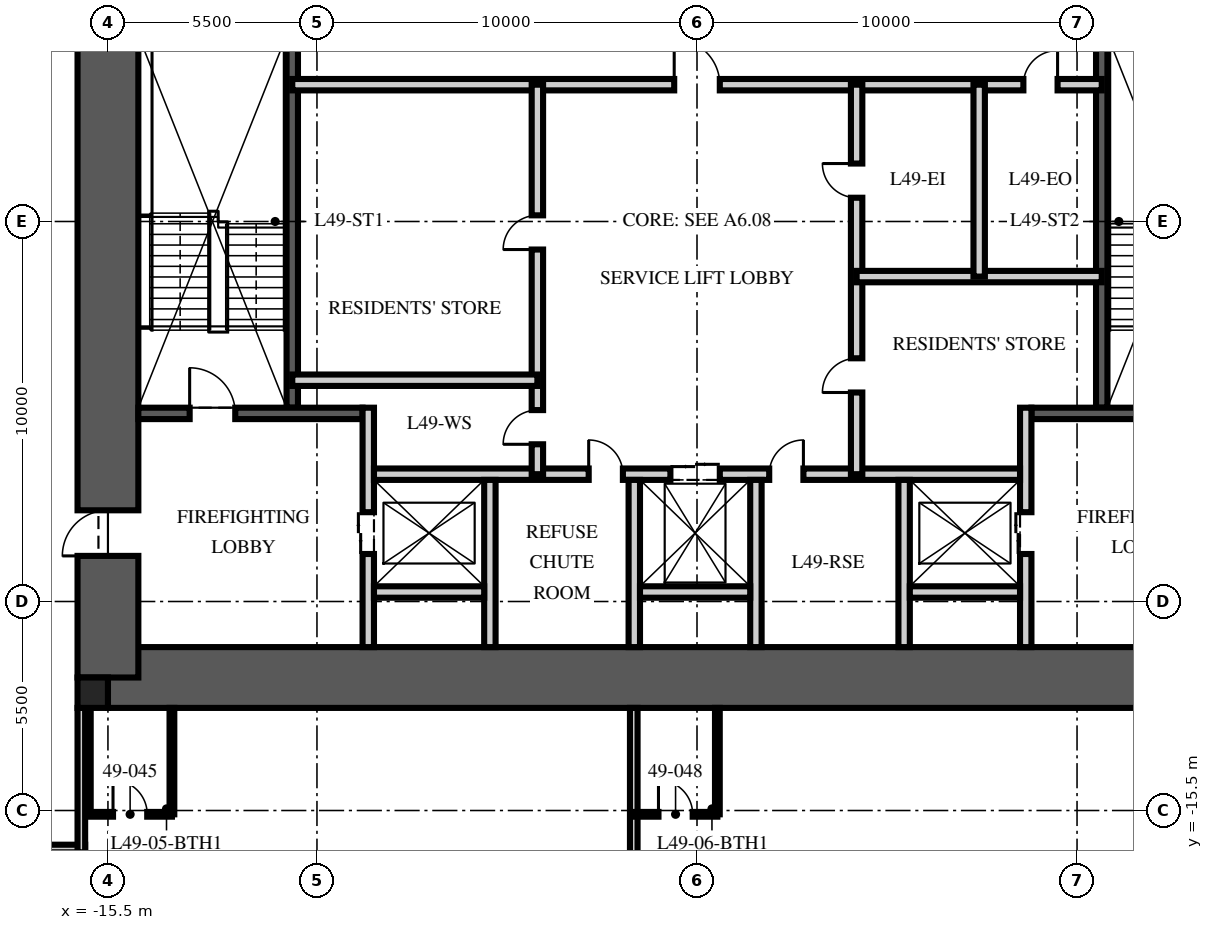
"""IFC4 building model, lengths in metres.
Left out: names, types, materials, properties, quantities, classifications, styles, units other than length and angle.
Written with IfcOpenShell. Run it as: python <this file> out.ifc"""

import sys

from ifc_helpers import new_model, si_unit, direction, frame, frame_2d, origin, origin_2d, place, context, subcontext, project, spatial, rectangle, extrude, element, fill, save


model = new_model("IFC4")
c1 = context("Model", 3, precision=1e-05, world=origin(), true_north=direction((0.0, 1.0)))
c2 = subcontext(c1, "Body", "Model", "MODEL_VIEW")
j1 = project(units=[si_unit("LENGTHUNIT", "METRE"), si_unit("PLANEANGLEUNIT", "RADIAN")], contexts=[c1])
p1 = place(None, origin())
s1 = spatial("IfcSite", under=j1, at=p1, CompositionType="ELEMENT")
p2 = place(p1, origin())
s2 = spatial("IfcBuilding", under=s1, at=p2, CompositionType="ELEMENT")
p3 = place(p2, frame((0.0, 0.0, 199.5)))
s3 = spatial("IfcBuildingStorey", under=s2, at=p3, CompositionType="ELEMENT", Elevation=199.5)
p4 = place(p3, frame((-15.5, -12.0, -0.25), z_axis=(0.0, 0.0, 1.0), x_axis=(1.0, 0.0, 0.0)))
e1 = element("IfcWall", 1, at=p4, inside=s3, PredefinedType="SHEAR", context=c2, shape_type="SweptSolid", body=[
    extrude(rectangle(XDim=31.0, YDim=1.6, at=frame_2d((15.5, 0.0))), origin(), (0.0, 0.0, 1.0), 3.75),
])
p5 = place(p3, frame((-15.5, -12.0, -0.25), z_axis=(0.0, 0.0, 1.0), x_axis=(0.0, 1.0, 0.0)))
e2 = element("IfcWall", 2, at=p5, inside=s3, PredefinedType="SHEAR", context=c2, shape_type="SweptSolid", body=[
    extrude(rectangle(XDim=24.0, YDim=1.6, at=frame_2d((12.0, 0.0))), origin(), (0.0, 0.0, 1.0), 3.75),
])
p6 = place(p5, frame((3.2, 0.0, 0.25)))
e3 = element("IfcOpeningElement", 3, at=p6, cuts=e2, PredefinedType="OPENING", context=c2, shape_type="SweptSolid", body=[
    extrude(rectangle(XDim=1.2, YDim=2.1, at=frame_2d((0.6, 1.05))), frame((0.0, 0.81, 0.0), z_axis=(0.0, -1.0, 0.0), x_axis=(1.0, 0.0, 0.0)), (0.0, 0.0, 1.0), 1.62),
])
p7 = place(p5, frame((19.3, 0.0, 0.25)))
e4 = element("IfcOpeningElement", 4, at=p7, cuts=e2, PredefinedType="OPENING", context=c2, shape_type="SweptSolid", body=[
    extrude(rectangle(XDim=1.8, YDim=2.1, at=frame_2d((0.9, 1.05))), frame((0.0, 0.81, 0.0), z_axis=(0.0, -1.0, 0.0), x_axis=(1.0, 0.0, 0.0)), (0.0, 0.0, 1.0), 1.62),
])
p8 = place(p3, frame((-15.9, -12.4, -0.25), z_axis=(0.0, 0.0, 1.0), x_axis=(1.0, 0.0, 0.0)))
e5 = element("IfcColumn", 5, at=p8, inside=s3, PredefinedType="COLUMN", context=c2, shape_type="SweptSolid", body=[
    extrude(rectangle(XDim=0.8, YDim=0.8, at=origin_2d()), origin(), (0.0, 0.0, 1.0), 3.75),
])
p9 = place(p3, frame((-10.65, -4.9, 0.0), z_axis=(0.0, 0.0, 1.0), x_axis=(0.0, 1.0, 0.0)))
e6 = element("IfcWall", 6, at=p9, inside=s3, PredefinedType="SOLIDWALL", context=c2, shape_type="SweptSolid", body=[
    extrude(rectangle(XDim=10.1, YDim=0.3, at=frame_2d((5.05, 0.0))), origin(), (0.0, 0.0, 1.0), 3.5),
])
p10 = place(p3, frame((-14.7, -5.05, 0.0), z_axis=(0.0, 0.0, 1.0), x_axis=(1.0, 0.0, 0.0)))
e7 = element("IfcWall", 7, at=p10, inside=s3, PredefinedType="SOLIDWALL", context=c2, shape_type="SweptSolid", body=[
    extrude(rectangle(XDim=5.9, YDim=0.3, at=frame_2d((2.95, 0.0))), origin(), (0.0, 0.0, 1.0), 3.5),
])
p11 = place(p10, frame((1.35, 0.0, 0.0)))
e8 = element("IfcOpeningElement", 8, at=p11, cuts=e7, PredefinedType="OPENING", context=c2, shape_type="SweptSolid", body=[
    extrude(rectangle(XDim=1.2, YDim=2.1, at=frame_2d((0.6, 1.05))), frame((0.0, 0.16, 0.0), z_axis=(0.0, -1.0, 0.0), x_axis=(1.0, 0.0, 0.0)), (0.0, 0.0, 1.0), 0.32),
])
p12 = place(p3, frame((-8.65, -11.2, 0.0), z_axis=(0.0, 0.0, 1.0), x_axis=(0.0, 1.0, 0.0)))
e9 = element("IfcWall", 9, at=p12, inside=s3, PredefinedType="PARTITIONING", context=c2, shape_type="SweptSolid", body=[
    extrude(rectangle(XDim=6.3, YDim=0.3, at=frame_2d((3.15, 0.0))), origin(), (0.0, 0.0, 1.0), 3.5),
])
p13 = place(p12, frame((2.45, 0.0, 0.0)))
e10 = element("IfcOpeningElement", 10, at=p13, cuts=e9, PredefinedType="OPENING", context=c2, shape_type="SweptSolid", body=[
    extrude(rectangle(XDim=1.1, YDim=2.1, at=frame_2d((0.55, 1.05))), frame((0.0, 0.16, 0.0), z_axis=(0.0, -1.0, 0.0), x_axis=(1.0, 0.0, 0.0)), (0.0, 0.0, 1.0), 0.32),
])
p14 = place(p3, frame((10.65, -4.9, 0.0), z_axis=(0.0, 0.0, 1.0), x_axis=(0.0, 1.0, 0.0)))
e11 = element("IfcWall", 11, at=p14, inside=s3, PredefinedType="SOLIDWALL", context=c2, shape_type="SweptSolid", body=[
    extrude(rectangle(XDim=10.1, YDim=0.3, at=frame_2d((5.05, 0.0))), origin(), (0.0, 0.0, 1.0), 3.5),
])
p15 = place(p3, frame((14.7, -5.05, 0.0), z_axis=(0.0, 0.0, 1.0), x_axis=(-1.0, 0.0, 0.0)))
e12 = element("IfcWall", 12, at=p15, inside=s3, PredefinedType="SOLIDWALL", context=c2, shape_type="SweptSolid", body=[
    extrude(rectangle(XDim=5.9, YDim=0.3, at=frame_2d((2.95, 0.0))), origin(), (0.0, 0.0, 1.0), 3.5),
])
p16 = place(p15, frame((1.35, 0.0, 0.0)))
e13 = element("IfcOpeningElement", 13, at=p16, cuts=e12, PredefinedType="OPENING", context=c2, shape_type="SweptSolid", body=[
    extrude(rectangle(XDim=1.2, YDim=2.1, at=frame_2d((0.6, 1.05))), frame((0.0, 0.16, 0.0), z_axis=(0.0, -1.0, 0.0), x_axis=(1.0, 0.0, 0.0)), (0.0, 0.0, 1.0), 0.32),
])
p17 = place(p3, frame((8.65, -11.2, 0.0), z_axis=(0.0, 0.0, 1.0), x_axis=(0.0, 1.0, 0.0)))
e14 = element("IfcWall", 14, at=p17, inside=s3, PredefinedType="PARTITIONING", context=c2, shape_type="SweptSolid", body=[
    extrude(rectangle(XDim=6.3, YDim=0.3, at=frame_2d((3.15, 0.0))), origin(), (0.0, 0.0, 1.0), 3.5),
])
p18 = place(p17, frame((2.45, 0.0, 0.0)))
e15 = element("IfcOpeningElement", 15, at=p18, cuts=e14, PredefinedType="OPENING", context=c2, shape_type="SweptSolid", body=[
    extrude(rectangle(XDim=1.1, YDim=2.1, at=frame_2d((0.55, 1.05))), frame((0.0, 0.16, 0.0), z_axis=(0.0, -1.0, 0.0), x_axis=(1.0, 0.0, 0.0)), (0.0, 0.0, 1.0), 0.32),
])
p19 = place(p3, frame((-8.5, -6.65, 0.0), z_axis=(0.0, 0.0, 1.0), x_axis=(1.0, 0.0, 0.0)))
e16 = element("IfcWall", 16, at=p19, inside=s3, PredefinedType="PARTITIONING", context=c2, shape_type="SweptSolid", body=[
    extrude(rectangle(XDim=17.0, YDim=0.3, at=frame_2d((8.5, 0.0))), origin(), (0.0, 0.0, 1.0), 3.5),
])
p20 = place(p19, frame((7.8, 0.0, 0.0)))
e17 = element("IfcOpeningElement", 17, at=p20, cuts=e16, PredefinedType="OPENING", context=c2, shape_type="SweptSolid", body=[
    extrude(rectangle(XDim=1.3, YDim=2.4, at=frame_2d((0.65, 1.2))), frame((0.0, 0.16, 0.0), z_axis=(0.0, -1.0, 0.0), x_axis=(1.0, 0.0, 0.0)), (0.0, 0.0, 1.0), 0.32),
])
p21 = place(p19, frame((5.65, 0.0, 0.0)))
e18 = element("IfcOpeningElement", 18, at=p21, cuts=e16, PredefinedType="OPENING", context=c2, shape_type="SweptSolid", body=[
    extrude(rectangle(XDim=0.9, YDim=2.1, at=frame_2d((0.45, 1.05))), frame((0.0, 0.16, 0.0), z_axis=(0.0, -1.0, 0.0), x_axis=(1.0, 0.0, 0.0)), (0.0, 0.0, 1.0), 0.32),
])
p22 = place(p19, frame((10.4, 0.0, 0.0)))
e19 = element("IfcOpeningElement", 19, at=p22, cuts=e16, PredefinedType="OPENING", context=c2, shape_type="SweptSolid", body=[
    extrude(rectangle(XDim=0.9, YDim=2.1, at=frame_2d((0.45, 1.05))), frame((0.0, 0.16, 0.0), z_axis=(0.0, -1.0, 0.0), x_axis=(1.0, 0.0, 0.0)), (0.0, 0.0, 1.0), 0.32),
])
for number, where, z_axis, x_axis in (
    (20, (-5.45, -11.2, 0.0), (0.0, 0.0, 1.0), (0.0, 1.0, 0.0)),
    (21, (-1.65, -11.2, 0.0), (0.0, 0.0, 1.0), (0.0, 1.0, 0.0)),
    (22, (1.55, -11.2, 0.0), (0.0, 0.0, 1.0), (0.0, 1.0, 0.0)),
    (23, (5.45, -11.2, 0.0), (0.0, 0.0, 1.0), (0.0, 1.0, 0.0)),
):
    element("IfcWall", number, at=place(p3, frame(where, z_axis=z_axis, x_axis=x_axis)), inside=s3, PredefinedType="PARTITIONING", context=c2, shape_type="SweptSolid", body=[
        extrude(rectangle(XDim=4.4, YDim=0.3, at=frame_2d((2.2, 0.0))), origin(), (0.0, 0.0, 1.0), 3.5),
    ])
for number, where, z_axis, x_axis in (
    (24, (-8.5, -9.75, 0.0), (0.0, 0.0, 1.0), (1.0, 0.0, 0.0)),
    (25, (-1.5, -9.75, 0.0), (0.0, 0.0, 1.0), (1.0, 0.0, 0.0)),
    (26, (5.6, -9.75, 0.0), (0.0, 0.0, 1.0), (1.0, 0.0, 0.0)),
):
    element("IfcWall", number, at=place(p3, frame(where, z_axis=z_axis, x_axis=x_axis)), inside=s3, PredefinedType="PARTITIONING", context=c2, shape_type="SweptSolid", body=[
        extrude(rectangle(XDim=2.9, YDim=0.3, at=frame_2d((1.45, 0.0))), origin(), (0.0, 0.0, 1.0), 3.5),
    ])
p23 = place(p3, frame((-10.65, 3.6, 0.0), z_axis=(0.0, 0.0, 1.0), x_axis=(1.0, 0.0, 0.0)))
e27 = element("IfcWall", 27, at=p23, inside=s3, PredefinedType="PARTITIONING", context=c2, shape_type="SweptSolid", body=[
    extrude(rectangle(XDim=21.3, YDim=0.3, at=frame_2d((10.65, 0.0))), origin(), (0.0, 0.0, 1.0), 3.5),
])
p24 = place(p23, frame((10.05, 0.0, 0.0)))
e28 = element("IfcOpeningElement", 28, at=p24, cuts=e27, PredefinedType="OPENING", context=c2, shape_type="SweptSolid", body=[
    extrude(rectangle(XDim=1.2, YDim=2.1, at=frame_2d((0.6, 1.05))), frame((0.0, 0.16, 0.0), z_axis=(0.0, -1.0, 0.0), x_axis=(1.0, 0.0, 0.0)), (0.0, 0.0, 1.0), 0.32),
])
p25 = place(p23, frame((19.238, 0.0, 0.0)))
e29 = element("IfcOpeningElement", 29, at=p25, cuts=e27, PredefinedType="OPENING", context=c2, shape_type="SweptSolid", body=[
    extrude(rectangle(XDim=0.9, YDim=2.1, at=frame_2d((0.45, 1.05))), frame((0.0, 0.16, 0.0), z_axis=(0.0, -1.0, 0.0), x_axis=(1.0, 0.0, 0.0)), (0.0, 0.0, 1.0), 0.32),
])
p26 = place(p3, frame((-4.2, -6.65, 0.0), z_axis=(0.0, 0.0, 1.0), x_axis=(0.0, 1.0, 0.0)))
e30 = element("IfcWall", 30, at=p26, inside=s3, PredefinedType="PARTITIONING", context=c2, shape_type="SweptSolid", body=[
    extrude(rectangle(XDim=10.25, YDim=0.3, at=frame_2d((5.125, 0.0))), origin(), (0.0, 0.0, 1.0), 3.5),
])
p27 = place(p26, frame((0.787, 0.0, 0.0)))
e31 = element("IfcOpeningElement", 31, at=p27, cuts=e30, PredefinedType="OPENING", context=c2, shape_type="SweptSolid", body=[
    extrude(rectangle(XDim=0.9, YDim=2.1, at=frame_2d((0.45, 1.05))), frame((0.0, 0.16, 0.0), z_axis=(0.0, -1.0, 0.0), x_axis=(1.0, 0.0, 0.0)), (0.0, 0.0, 1.0), 0.32),
])
p28 = place(p26, frame((5.912, 0.0, 0.0)))
e32 = element("IfcOpeningElement", 32, at=p28, cuts=e30, PredefinedType="OPENING", context=c2, shape_type="SweptSolid", body=[
    extrude(rectangle(XDim=0.9, YDim=2.1, at=frame_2d((0.45, 1.05))), frame((0.0, 0.16, 0.0), z_axis=(0.0, -1.0, 0.0), x_axis=(1.0, 0.0, 0.0)), (0.0, 0.0, 1.0), 0.32),
])
p29 = place(p3, frame((4.2, -6.65, 0.0), z_axis=(0.0, 0.0, 1.0), x_axis=(0.0, 1.0, 0.0)))
e33 = element("IfcWall", 33, at=p29, inside=s3, PredefinedType="PARTITIONING", context=c2, shape_type="SweptSolid", body=[
    extrude(rectangle(XDim=10.25, YDim=0.3, at=frame_2d((5.125, 0.0))), origin(), (0.0, 0.0, 1.0), 3.5),
])
p30 = place(p29, frame((2.15, 0.0, 0.0)))
e34 = element("IfcOpeningElement", 34, at=p30, cuts=e33, PredefinedType="OPENING", context=c2, shape_type="SweptSolid", body=[
    extrude(rectangle(XDim=0.9, YDim=2.1, at=frame_2d((0.45, 1.05))), frame((0.0, 0.16, 0.0), z_axis=(0.0, -1.0, 0.0), x_axis=(1.0, 0.0, 0.0)), (0.0, 0.0, 1.0), 0.32),
])
p31 = place(p29, frame((7.275, 0.0, 0.0)))
e35 = element("IfcOpeningElement", 35, at=p31, cuts=e33, PredefinedType="OPENING", context=c2, shape_type="SweptSolid", body=[
    extrude(rectangle(XDim=0.9, YDim=2.1, at=frame_2d((0.45, 1.05))), frame((0.0, 0.16, 0.0), z_axis=(0.0, -1.0, 0.0), x_axis=(1.0, 0.0, 0.0)), (0.0, 0.0, 1.0), 0.32),
])
for number, where, z_axis, x_axis in (
    (36, (-10.65, -4.177, 0.0), (0.0, 0.0, 1.0), (1.0, 0.0, 0.0)),
    (37, (10.65, -1.45, 0.0), (0.0, 0.0, 1.0), (-1.0, 0.0, 0.0)),
):
    element("IfcWall", number, at=place(p3, frame(where, z_axis=z_axis, x_axis=x_axis)), inside=s3, PredefinedType="PARTITIONING", context=c2, shape_type="SweptSolid", body=[
        extrude(rectangle(XDim=6.45, YDim=0.3, at=frame_2d((3.225, 0.0))), origin(), (0.0, 0.0, 1.0), 3.5),
    ])
p32 = place(p3, frame((7.425, -1.45, 0.0), z_axis=(0.0, 0.0, 1.0), x_axis=(0.0, 1.0, 0.0)))
e38 = element("IfcWall", 38, at=p32, inside=s3, PredefinedType="PARTITIONING", context=c2, shape_type="SweptSolid", body=[
    extrude(rectangle(XDim=5.05, YDim=0.3, at=frame_2d((2.525, 0.0))), origin(), (0.0, 0.0, 1.0), 3.5),
])
p33 = place(p3, frame((-19.3, -16.5, 0.0), z_axis=(0.0, 0.0, 1.0), x_axis=(1.0, 0.0, 0.0)))
e39 = element("IfcWall", 39, at=p33, inside=s3, PredefinedType="PARTITIONING", context=c2, shape_type="SweptSolid", body=[
    extrude(rectangle(XDim=3.2, YDim=0.2, at=frame_2d((1.6, 0.0))), origin(), (0.0, 0.0, 1.0), 2.3),
])
p34 = place(p3, frame((-16.2, -16.6, 0.0), z_axis=(0.0, 0.0, 1.0), x_axis=(0.0, 1.0, 0.0)))
e40 = element("IfcWall", 40, at=p34, inside=s3, PredefinedType="PARTITIONING", context=c2, shape_type="SweptSolid", body=[
    extrude(rectangle(XDim=3.8, YDim=0.2, at=frame_2d((1.9, 0.0))), origin(), (0.0, 0.0, 1.0), 2.3),
])
p35 = place(p3, frame((-1.664, -12.8, 0.0), z_axis=(0.0, 0.0, 1.0), x_axis=(0.0, -1.0, 0.0)))
e41 = element("IfcWall", 41, at=p35, inside=s3, PredefinedType="PARTITIONING", context=c2, shape_type="SweptSolid", body=[
    extrude(rectangle(XDim=13.65, YDim=0.2, at=frame_2d((6.825, 0.0))), origin(), (0.0, 0.0, 1.0), 2.91),
])
p36 = place(p3, frame((-16.017, -15.6, 0.0), z_axis=(0.0, 0.0, 1.0), x_axis=(1.0, 0.0, 0.0)))
e42 = element("IfcWall", 42, at=p36, inside=s3, PredefinedType="PARTITIONING", context=c2, shape_type="SweptSolid", body=[
    extrude(rectangle(XDim=2.2, YDim=0.125, at=frame_2d((1.1, 0.0))), origin(), (0.0, 0.0, 1.0), 3.5),
])
p37 = place(p36, frame((0.65, 0.0, 0.0)))
e43 = element("IfcOpeningElement", 43, at=p37, cuts=e42, PredefinedType="OPENING", context=c2, shape_type="SweptSolid", body=[
    extrude(rectangle(XDim=0.9, YDim=2.1, at=frame_2d((0.45, 1.05))), frame((0.0, 0.073, 0.0), z_axis=(0.0, -1.0, 0.0), x_axis=(1.0, 0.0, 0.0)), (0.0, 0.0, 1.0), 0.145),
])
p38 = place(p3, frame((-16.017, -12.8, 0.0), z_axis=(0.0, 0.0, 1.0), x_axis=(0.0, -1.0, 0.0)))
e44 = element("IfcWall", 44, at=p38, inside=s3, PredefinedType="PARTITIONING", context=c2, shape_type="SweptSolid", body=[
    extrude(rectangle(XDim=2.8, YDim=0.125, at=frame_2d((1.4, 0.0))), origin(), (0.0, 0.0, 1.0), 2.3),
])
p39 = place(p3, frame((-13.816, -12.8, 0.0), z_axis=(0.0, 0.0, 1.0), x_axis=(0.0, -1.0, 0.0)))
e45 = element("IfcWall", 45, at=p39, inside=s3, PredefinedType="PARTITIONING", context=c2, shape_type="SweptSolid", body=[
    extrude(rectangle(XDim=2.8, YDim=0.125, at=frame_2d((1.4, 0.0))), origin(), (0.0, 0.0, 1.0), 3.5),
])
p40 = place(p3, frame((-1.664, -15.6, 0.0), z_axis=(0.0, 0.0, 1.0), x_axis=(1.0, 0.0, 0.0)))
e46 = element("IfcWall", 46, at=p40, inside=s3, PredefinedType="PARTITIONING", context=c2, shape_type="SweptSolid", body=[
    extrude(rectangle(XDim=2.2, YDim=0.125, at=frame_2d((1.1, 0.0))), origin(), (0.0, 0.0, 1.0), 2.6),
])
p41 = place(p40, frame((0.65, 0.0, 0.0)))
e47 = element("IfcOpeningElement", 47, at=p41, cuts=e46, PredefinedType="OPENING", context=c2, shape_type="SweptSolid", body=[
    extrude(rectangle(XDim=0.9, YDim=2.1, at=frame_2d((0.45, 1.05))), frame((0.0, 0.073, 0.0), z_axis=(0.0, -1.0, 0.0), x_axis=(1.0, 0.0, 0.0)), (0.0, 0.0, 1.0), 0.145),
])
p42 = place(p3, frame((0.536, -12.8, 0.0), z_axis=(0.0, 0.0, 1.0), x_axis=(0.0, -1.0, 0.0)))
e48 = element("IfcWall", 48, at=p42, inside=s3, PredefinedType="PARTITIONING", context=c2, shape_type="SweptSolid", body=[
    extrude(rectangle(XDim=2.8, YDim=0.125, at=frame_2d((1.4, 0.0))), origin(), (0.0, 0.0, 1.0), 3.5),
])
p43 = place(p11, origin())
e49 = element("IfcDoor", 49, at=p43, inside=s3, OperationType="SINGLE_SWING_LEFT", PredefinedType="DOOR", context=c2, shape_type="SweptSolid", body=[
    extrude(rectangle(XDim=1.2, YDim=2.1, at=frame_2d((0.6, 1.05))), frame((0.0, 0.025, 0.0), z_axis=(0.0, -1.0, 0.0), x_axis=(1.0, 0.0, 0.0)), (0.0, 0.0, 1.0), 0.05),
])
fill(e8, e49)
p44 = place(p6, origin())
e50 = element("IfcDoor", 50, at=p44, inside=s3, OperationType="SINGLE_SWING_LEFT", PredefinedType="DOOR", context=c2, shape_type="SweptSolid", body=[
    extrude(rectangle(XDim=1.2, YDim=2.1, at=frame_2d((0.6, 1.05))), frame((0.0, 0.025, 0.0), z_axis=(0.0, -1.0, 0.0), x_axis=(1.0, 0.0, 0.0)), (0.0, 0.0, 1.0), 0.05),
])
fill(e3, e50)
p45 = place(p13, origin())
e51 = element("IfcDoor", 51, at=p45, inside=s3, OperationType="DOUBLE_DOOR_SLIDING", PredefinedType="DOOR", context=c2, shape_type="SweptSolid", body=[
    extrude(rectangle(XDim=1.1, YDim=2.1, at=frame_2d((0.55, 1.05))), frame((0.0, 0.025, 0.0), z_axis=(0.0, -1.0, 0.0), x_axis=(1.0, 0.0, 0.0)), (0.0, 0.0, 1.0), 0.05),
])
fill(e10, e51)
p46 = place(p18, origin())
e52 = element("IfcDoor", 52, at=p46, inside=s3, OperationType="DOUBLE_DOOR_SLIDING", PredefinedType="DOOR", context=c2, shape_type="SweptSolid", body=[
    extrude(rectangle(XDim=1.1, YDim=2.1, at=frame_2d((0.55, 1.05))), frame((0.0, 0.025, 0.0), z_axis=(0.0, -1.0, 0.0), x_axis=(1.0, 0.0, 0.0)), (0.0, 0.0, 1.0), 0.05),
])
fill(e15, e52)
p47 = place(p20, origin())
e53 = element("IfcDoor", 53, at=p47, inside=s3, OperationType="DOUBLE_DOOR_SLIDING", PredefinedType="DOOR", context=c2, shape_type="SweptSolid", body=[
    extrude(rectangle(XDim=1.3, YDim=2.4, at=frame_2d((0.65, 1.2))), frame((0.0, 0.025, 0.0), z_axis=(0.0, -1.0, 0.0), x_axis=(1.0, 0.0, 0.0)), (0.0, 0.0, 1.0), 0.05),
])
fill(e17, e53)
p48 = place(p24, origin())
e54 = element("IfcDoor", 54, at=p48, inside=s3, OperationType="SINGLE_SWING_LEFT", PredefinedType="DOOR", context=c2, shape_type="SweptSolid", body=[
    extrude(rectangle(XDim=1.2, YDim=2.1, at=frame_2d((0.6, 1.05))), frame((0.0, 0.025, 0.0), z_axis=(0.0, -1.0, 0.0), x_axis=(1.0, 0.0, 0.0)), (0.0, 0.0, 1.0), 0.05),
])
fill(e28, e54)
p49 = place(p21, origin())
e55 = element("IfcDoor", 55, at=p49, inside=s3, OperationType="SINGLE_SWING_LEFT", PredefinedType="DOOR", context=c2, shape_type="SweptSolid", body=[
    extrude(rectangle(XDim=0.9, YDim=2.1, at=frame_2d((0.45, 1.05))), frame((0.0, 0.025, 0.0), z_axis=(0.0, -1.0, 0.0), x_axis=(1.0, 0.0, 0.0)), (0.0, 0.0, 1.0), 0.05),
])
fill(e18, e55)
p50 = place(p22, origin())
e56 = element("IfcDoor", 56, at=p50, inside=s3, OperationType="SINGLE_SWING_RIGHT", PredefinedType="DOOR", context=c2, shape_type="SweptSolid", body=[
    extrude(rectangle(XDim=0.9, YDim=2.1, at=frame_2d((0.45, 1.05))), frame((0.0, 0.025, 0.0), z_axis=(0.0, -1.0, 0.0), x_axis=(1.0, 0.0, 0.0)), (0.0, 0.0, 1.0), 0.05),
])
fill(e19, e56)
p51 = place(p27, origin())
e57 = element("IfcDoor", 57, at=p51, inside=s3, OperationType="SINGLE_SWING_LEFT", PredefinedType="DOOR", context=c2, shape_type="SweptSolid", body=[
    extrude(rectangle(XDim=0.9, YDim=2.1, at=frame_2d((0.45, 1.05))), frame((0.0, 0.025, 0.0), z_axis=(0.0, -1.0, 0.0), x_axis=(1.0, 0.0, 0.0)), (0.0, 0.0, 1.0), 0.05),
])
fill(e31, e57)
p52 = place(p28, origin())
e58 = element("IfcDoor", 58, at=p52, inside=s3, OperationType="SINGLE_SWING_LEFT", PredefinedType="DOOR", context=c2, shape_type="SweptSolid", body=[
    extrude(rectangle(XDim=0.9, YDim=2.1, at=frame_2d((0.45, 1.05))), frame((0.0, 0.025, 0.0), z_axis=(0.0, -1.0, 0.0), x_axis=(1.0, 0.0, 0.0)), (0.0, 0.0, 1.0), 0.05),
])
fill(e32, e58)
p53 = place(p30, origin())
e59 = element("IfcDoor", 59, at=p53, inside=s3, OperationType="SINGLE_SWING_LEFT", PredefinedType="DOOR", context=c2, shape_type="SweptSolid", body=[
    extrude(rectangle(XDim=0.9, YDim=2.1, at=frame_2d((0.45, 1.05))), frame((0.0, 0.025, 0.0), z_axis=(0.0, -1.0, 0.0), x_axis=(1.0, 0.0, 0.0)), (0.0, 0.0, 1.0), 0.05),
])
fill(e34, e59)
p54 = place(p31, origin())
e60 = element("IfcDoor", 60, at=p54, inside=s3, OperationType="SINGLE_SWING_RIGHT", PredefinedType="DOOR", context=c2, shape_type="SweptSolid", body=[
    extrude(rectangle(XDim=0.9, YDim=2.1, at=frame_2d((0.45, 1.05))), frame((0.0, 0.025, 0.0), z_axis=(0.0, -1.0, 0.0), x_axis=(1.0, 0.0, 0.0)), (0.0, 0.0, 1.0), 0.05),
])
fill(e35, e60)
p55 = place(p25, origin())
e61 = element("IfcDoor", 61, at=p55, inside=s3, OperationType="SINGLE_SWING_RIGHT", PredefinedType="DOOR", context=c2, shape_type="SweptSolid", body=[
    extrude(rectangle(XDim=0.9, YDim=2.1, at=frame_2d((0.45, 1.05))), frame((0.0, 0.025, 0.0), z_axis=(0.0, -1.0, 0.0), x_axis=(1.0, 0.0, 0.0)), (0.0, 0.0, 1.0), 0.05),
])
fill(e29, e61)
p56 = place(p37, origin())
e62 = element("IfcDoor", 62, at=p56, inside=s3, OperationType="SINGLE_SWING_LEFT", PredefinedType="DOOR", context=c2, shape_type="SweptSolid", body=[
    extrude(rectangle(XDim=0.9, YDim=2.1, at=frame_2d((0.45, 1.05))), frame((0.0, 0.025, 0.0), z_axis=(0.0, -1.0, 0.0), x_axis=(1.0, 0.0, 0.0)), (0.0, 0.0, 1.0), 0.05),
])
fill(e43, e62)
p57 = place(p41, origin())
e63 = element("IfcDoor", 63, at=p57, inside=s3, OperationType="SINGLE_SWING_LEFT", PredefinedType="DOOR", context=c2, shape_type="SweptSolid", body=[
    extrude(rectangle(XDim=0.9, YDim=2.1, at=frame_2d((0.45, 1.05))), frame((0.0, 0.025, 0.0), z_axis=(0.0, -1.0, 0.0), x_axis=(1.0, 0.0, 0.0)), (0.0, 0.0, 1.0), 0.05),
])
fill(e47, e63)
save(model, sys.argv[1])
